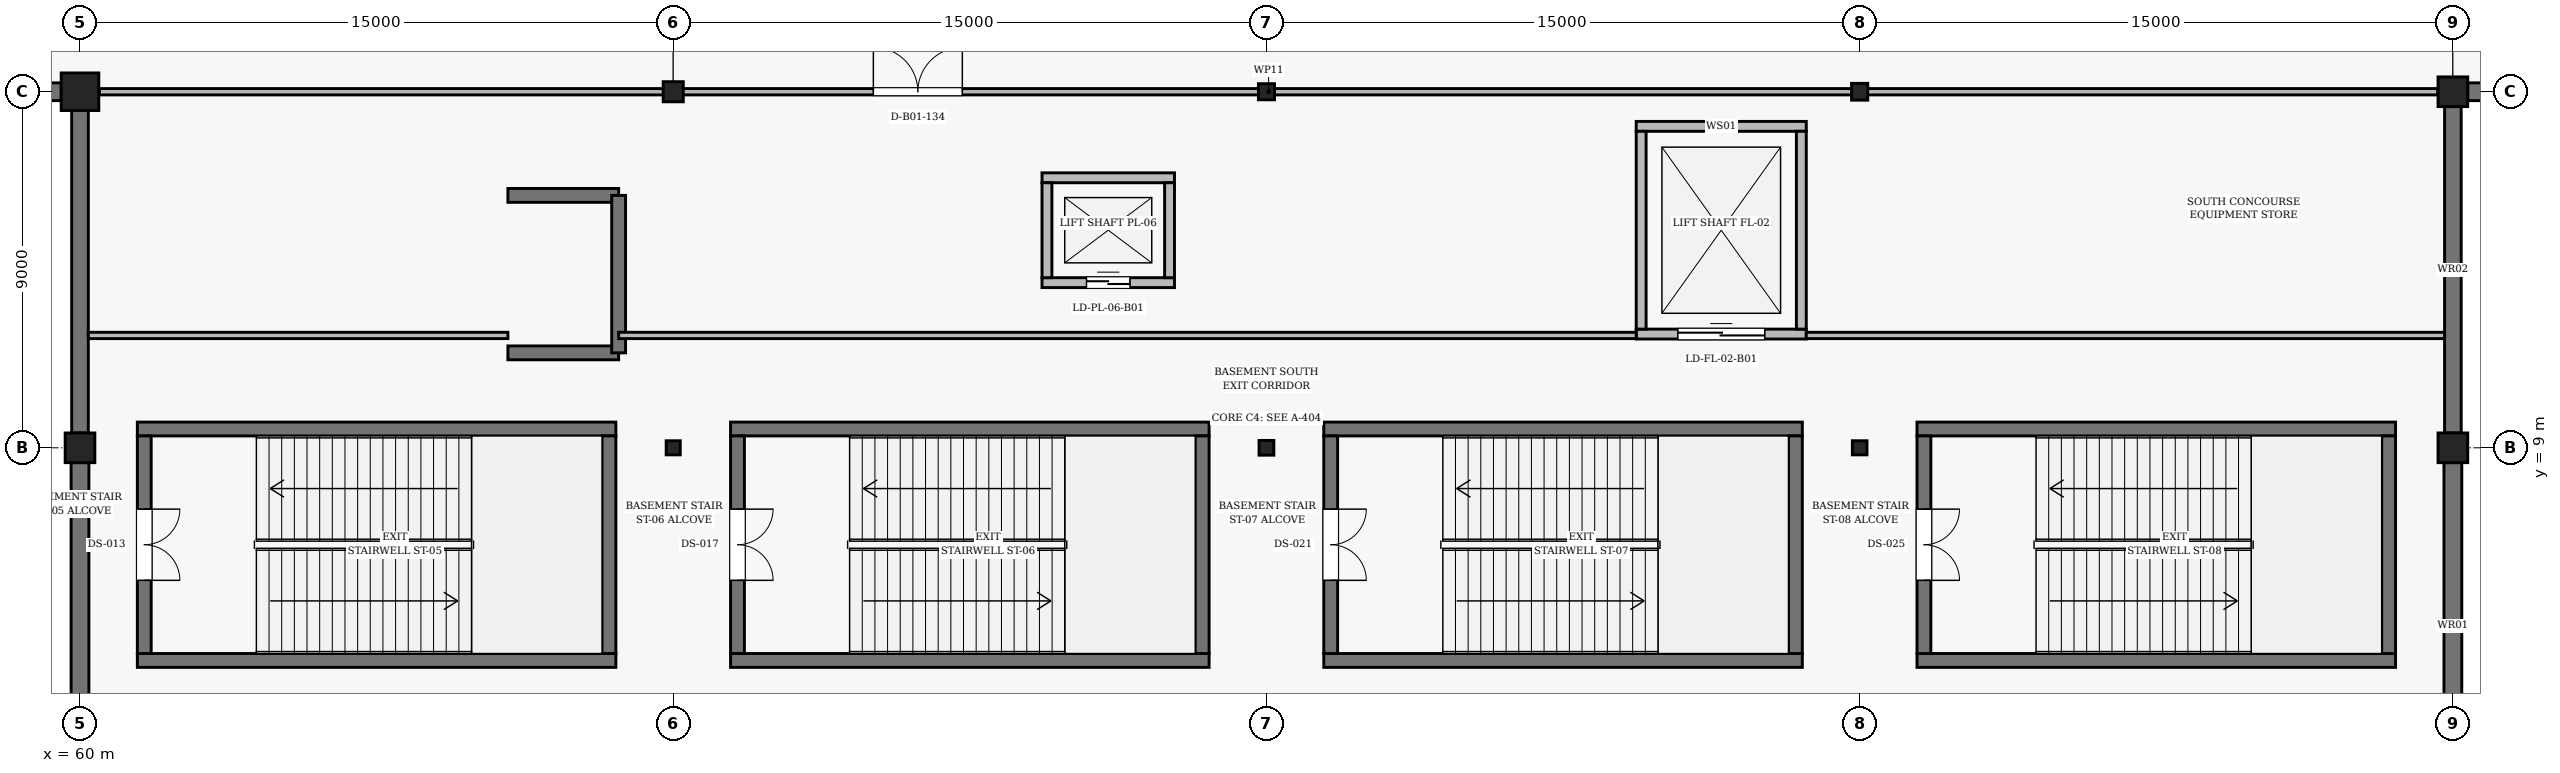
"""IFC4 building model, lengths in metres.
Left out: names, types, materials, properties, quantities, classifications, styles, units other than length and angle.
Written with IfcOpenShell. Run it as: python <this file> out.ifc"""

import sys

from ifc_helpers import new_model, si_unit, direction, frame, frame_2d, origin, origin_2d, place, context, subcontext, project, spatial, rectangle, hollow_circle, i_section, extrude, element, fill, save


model = new_model("IFC4")
c1 = context("Model", 3, precision=1e-05, world=origin(), true_north=direction((0.0, 1.0)))
c2 = subcontext(c1, "Body", "Model", "MODEL_VIEW")
j1 = project(units=[si_unit("LENGTHUNIT", "METRE"), si_unit("PLANEANGLEUNIT", "RADIAN")], contexts=[c1])
p1 = place(None, origin())
s1 = spatial("IfcSite", under=j1, at=p1, CompositionType="ELEMENT")
p2 = place(p1, origin())
s2 = spatial("IfcBuilding", under=s1, at=p2, CompositionType="ELEMENT")
p3 = place(p2, frame((0.0, 0.0, -5.4)))
s3 = spatial("IfcBuildingStorey", under=s2, at=p3, CompositionType="ELEMENT", Elevation=-5.4)
p4 = place(p3, frame((60.0, 9.0, 0.0), z_axis=(0.0, 0.0, 1.0), x_axis=(1.0, 0.0, 0.0)))
e1 = element("IfcColumn", 1, at=p4, inside=s3, PredefinedType="COLUMN", context=c2, shape_type="SweptSolid", body=[
    extrude(rectangle(XDim=0.75, YDim=0.75, at=origin_2d()), origin(), (0.0, 0.0, 1.0), 5.4),
])
p5 = place(p3, frame((60.0, 18.0, 0.0), z_axis=(0.0, 0.0, 1.0), x_axis=(1.0, 0.0, 0.0)))
e2 = element("IfcColumn", 2, at=p5, inside=s3, PredefinedType="COLUMN", context=c2, shape_type="SweptSolid", body=[
    extrude(rectangle(XDim=0.95, YDim=0.95, at=origin_2d()), origin(), (0.0, 0.0, 1.0), 5.4),
])
p6 = place(p3, frame((75.0, 9.0, 0.0), z_axis=(0.0, 0.0, 1.0), x_axis=(1.0, 0.0, 0.0)))
e3 = element("IfcColumn", 3, at=p6, inside=s3, PredefinedType="COLUMN", context=c2, shape_type="SweptSolid", body=[
    extrude(hollow_circle(Radius=0.178, WallThickness=0.016, at=origin_2d()), origin(), (0.0, 0.0, 1.0), 5.4),
])
p7 = place(p3, frame((75.0, 18.0, 0.0), z_axis=(0.0, 0.0, 1.0), x_axis=(1.0, 0.0, 0.0)))
e4 = element("IfcColumn", 4, at=p7, inside=s3, PredefinedType="COLUMN", context=c2, shape_type="SweptSolid", body=[
    extrude(hollow_circle(Radius=0.254, WallThickness=0.02, at=origin_2d()), origin(), (0.0, 0.0, 1.0), 5.4),
])
p8 = place(p3, frame((90.0, 9.0, 0.0), z_axis=(0.0, 0.0, 1.0), x_axis=(1.0, 0.0, 0.0)))
e5 = element("IfcColumn", 5, at=p8, inside=s3, PredefinedType="COLUMN", context=c2, shape_type="SweptSolid", body=[
    extrude(i_section(OverallWidth=0.374, OverallDepth=0.372, WebThickness=0.016, FlangeThickness=0.026, FilletRadius=0.016, at=origin_2d()), origin(), (0.0, 0.0, 1.0), 5.4),
])
p9 = place(p3, frame((90.0, 18.0, 0.0), z_axis=(0.0, 0.0, 1.0), x_axis=(1.0, 0.0, 0.0)))
e6 = element("IfcColumn", 6, at=p9, inside=s3, PredefinedType="COLUMN", context=c2, shape_type="SweptSolid", body=[
    extrude(hollow_circle(Radius=0.203, WallThickness=0.016, at=origin_2d()), origin(), (0.0, 0.0, 1.0), 5.4),
])
p10 = place(p3, frame((105.0, 9.0, 0.0), z_axis=(0.0, 0.0, 1.0), x_axis=(1.0, 0.0, 0.0)))
e7 = element("IfcColumn", 7, at=p10, inside=s3, PredefinedType="COLUMN", context=c2, shape_type="SweptSolid", body=[
    extrude(i_section(OverallWidth=0.369, OverallDepth=0.356, WebThickness=0.011, FlangeThickness=0.018, FilletRadius=0.015, at=origin_2d()), origin(), (0.0, 0.0, 1.0), 5.4),
])
p11 = place(p3, frame((105.0, 18.0, 0.0), z_axis=(0.0, 0.0, 1.0), x_axis=(1.0, 0.0, 0.0)))
e8 = element("IfcColumn", 8, at=p11, inside=s3, PredefinedType="COLUMN", context=c2, shape_type="SweptSolid", body=[
    extrude(i_section(OverallWidth=0.409, OverallDepth=0.425, WebThickness=0.031, FlangeThickness=0.049, FilletRadius=0.02, at=origin_2d()), origin(), (0.0, 0.0, 1.0), 5.4),
])
for number, where, z_axis, x_axis in (
    (9, (120.0, 9.0, 0.0), (0.0, 0.0, 1.0), (1.0, 0.0, 0.0)),
    (10, (120.0, 18.0, 0.0), (0.0, 0.0, 1.0), (1.0, 0.0, 0.0)),
):
    element("IfcColumn", number, at=place(p3, frame(where, z_axis=z_axis, x_axis=x_axis)), inside=s3, PredefinedType="COLUMN", context=c2, shape_type="SweptSolid", body=[
        extrude(rectangle(XDim=0.75, YDim=0.75, at=origin_2d()), origin(), (0.0, 0.0, 1.0), 5.4),
    ])
p12 = place(p3, frame((134.625, 18.0, 0.0), z_axis=(0.0, 0.0, 1.0), x_axis=(-1.0, 0.0, 0.0)))
e11 = element("IfcWall", 11, at=p12, inside=s3, PredefinedType="USERDEFINED", context=c2, shape_type="SweptSolid", body=[
    extrude(rectangle(XDim=14.25, YDim=0.45, at=frame_2d((7.125, 0.0))), origin(), (0.0, 0.0, 1.0), 5.05),
])
p13 = place(p3, frame((120.0, 17.625, 0.0), z_axis=(0.0, 0.0, 1.0), x_axis=(0.0, -1.0, 0.0)))
e12 = element("IfcWall", 12, at=p13, inside=s3, PredefinedType="USERDEFINED", context=c2, shape_type="SweptSolid", body=[
    extrude(rectangle(XDim=8.25, YDim=0.42, at=frame_2d((4.125, 0.0))), origin(), (0.0, 0.0, 1.0), 4.546),
])
p14 = place(p3, frame((120.0, 8.625, 0.0), z_axis=(0.0, 0.0, 1.0), x_axis=(0.0, -1.0, 0.0)))
e13 = element("IfcWall", 13, at=p14, inside=s3, PredefinedType="USERDEFINED", context=c2, shape_type="SweptSolid", body=[
    extrude(rectangle(XDim=8.25, YDim=0.45, at=frame_2d((4.125, 0.0))), origin(), (0.0, 0.0, 1.0), 4.785),
])
p15 = place(p3, frame((60.0, 0.375, 0.0), z_axis=(0.0, 0.0, 1.0), x_axis=(0.0, 1.0, 0.0)))
e14 = element("IfcWall", 14, at=p15, inside=s3, PredefinedType="USERDEFINED", context=c2, shape_type="SweptSolid", body=[
    extrude(rectangle(XDim=8.25, YDim=0.45, at=frame_2d((4.125, 0.0))), origin(), (0.0, 0.0, 1.0), 4.312),
])
p16 = place(p3, frame((60.0, 9.375, 0.0), z_axis=(0.0, 0.0, 1.0), x_axis=(0.0, 1.0, 0.0)))
e15 = element("IfcWall", 15, at=p16, inside=s3, PredefinedType="USERDEFINED", context=c2, shape_type="SweptSolid", body=[
    extrude(rectangle(XDim=8.15, YDim=0.42, at=frame_2d((4.075, 0.0))), origin(), (0.0, 0.0, 1.0), 4.39),
])
p17 = place(p3, frame((59.525, 18.0, 0.0), z_axis=(0.0, 0.0, 1.0), x_axis=(-1.0, 0.0, 0.0)))
e16 = element("IfcWall", 16, at=p17, inside=s3, PredefinedType="USERDEFINED", context=c2, shape_type="SweptSolid", body=[
    extrude(rectangle(XDim=14.15, YDim=0.45, at=frame_2d((7.075, 0.0))), origin(), (0.0, 0.0, 1.0), 4.735),
])
for number, where, z_axis, x_axis in (
    (17, (61.45, 3.625, 0.0), (0.0, 0.0, 1.0), (1.0, 0.0, 0.0)),
    (18, (73.55, 9.475, 0.0), (0.0, 0.0, 1.0), (-1.0, 0.0, 0.0)),
):
    element("IfcWall", number, at=place(p3, frame(where, z_axis=z_axis, x_axis=x_axis)), inside=s3, PredefinedType="SHEAR", context=c2, shape_type="SweptSolid", body=[
        extrude(rectangle(XDim=12.1, YDim=0.35, at=frame_2d((6.05, 0.0))), origin(), (0.0, 0.0, 1.0), 5.1),
    ])
p18 = place(p3, frame((61.625, 9.3, 0.0), z_axis=(0.0, 0.0, 1.0), x_axis=(0.0, -1.0, 0.0)))
e19 = element("IfcWall", 19, at=p18, inside=s3, PredefinedType="SHEAR", context=c2, shape_type="SweptSolid", body=[
    extrude(rectangle(XDim=5.5, YDim=0.35, at=frame_2d((2.75, 0.0))), origin(), (0.0, 0.0, 1.0), 5.1),
])
p19 = place(p18, frame((1.85, 0.0, 0.0)))
e20 = element("IfcOpeningElement", 20, at=p19, cuts=e19, PredefinedType="OPENING", context=c2, shape_type="SweptSolid", body=[
    extrude(rectangle(XDim=1.8, YDim=2.2, at=frame_2d((0.9, 1.1))), frame((0.0, 0.185, 0.0), z_axis=(0.0, -1.0, 0.0), x_axis=(1.0, 0.0, 0.0)), (0.0, 0.0, 1.0), 0.37),
])
p20 = place(p3, frame((73.375, 3.8, 0.0), z_axis=(0.0, 0.0, 1.0), x_axis=(0.0, 1.0, 0.0)))
e21 = element("IfcWall", 21, at=p20, inside=s3, PredefinedType="SHEAR", context=c2, shape_type="SweptSolid", body=[
    extrude(rectangle(XDim=5.5, YDim=0.35, at=frame_2d((2.75, 0.0))), origin(), (0.0, 0.0, 1.0), 5.1),
])
for number, where, z_axis, x_axis in (
    (22, (76.45, 3.625, 0.0), (0.0, 0.0, 1.0), (1.0, 0.0, 0.0)),
    (23, (88.55, 9.475, 0.0), (0.0, 0.0, 1.0), (-1.0, 0.0, 0.0)),
):
    element("IfcWall", number, at=place(p3, frame(where, z_axis=z_axis, x_axis=x_axis)), inside=s3, PredefinedType="SHEAR", context=c2, shape_type="SweptSolid", body=[
        extrude(rectangle(XDim=12.1, YDim=0.35, at=frame_2d((6.05, 0.0))), origin(), (0.0, 0.0, 1.0), 5.1),
    ])
p21 = place(p3, frame((76.625, 9.3, 0.0), z_axis=(0.0, 0.0, 1.0), x_axis=(0.0, -1.0, 0.0)))
e24 = element("IfcWall", 24, at=p21, inside=s3, PredefinedType="SHEAR", context=c2, shape_type="SweptSolid", body=[
    extrude(rectangle(XDim=5.5, YDim=0.35, at=frame_2d((2.75, 0.0))), origin(), (0.0, 0.0, 1.0), 5.1),
])
p22 = place(p21, frame((1.85, 0.0, 0.0)))
e25 = element("IfcOpeningElement", 25, at=p22, cuts=e24, PredefinedType="OPENING", context=c2, shape_type="SweptSolid", body=[
    extrude(rectangle(XDim=1.8, YDim=2.2, at=frame_2d((0.9, 1.1))), frame((0.0, 0.185, 0.0), z_axis=(0.0, -1.0, 0.0), x_axis=(1.0, 0.0, 0.0)), (0.0, 0.0, 1.0), 0.37),
])
p23 = place(p3, frame((88.375, 3.8, 0.0), z_axis=(0.0, 0.0, 1.0), x_axis=(0.0, 1.0, 0.0)))
e26 = element("IfcWall", 26, at=p23, inside=s3, PredefinedType="SHEAR", context=c2, shape_type="SweptSolid", body=[
    extrude(rectangle(XDim=5.5, YDim=0.35, at=frame_2d((2.75, 0.0))), origin(), (0.0, 0.0, 1.0), 5.1),
])
for number, where, z_axis, x_axis in (
    (27, (91.45, 3.625, 0.0), (0.0, 0.0, 1.0), (1.0, 0.0, 0.0)),
    (28, (103.55, 9.475, 0.0), (0.0, 0.0, 1.0), (-1.0, 0.0, 0.0)),
):
    element("IfcWall", number, at=place(p3, frame(where, z_axis=z_axis, x_axis=x_axis)), inside=s3, PredefinedType="SHEAR", context=c2, shape_type="SweptSolid", body=[
        extrude(rectangle(XDim=12.1, YDim=0.35, at=frame_2d((6.05, 0.0))), origin(), (0.0, 0.0, 1.0), 5.1),
    ])
p24 = place(p3, frame((91.625, 9.3, 0.0), z_axis=(0.0, 0.0, 1.0), x_axis=(0.0, -1.0, 0.0)))
e29 = element("IfcWall", 29, at=p24, inside=s3, PredefinedType="SHEAR", context=c2, shape_type="SweptSolid", body=[
    extrude(rectangle(XDim=5.5, YDim=0.35, at=frame_2d((2.75, 0.0))), origin(), (0.0, 0.0, 1.0), 5.1),
])
p25 = place(p24, frame((1.85, 0.0, 0.0)))
e30 = element("IfcOpeningElement", 30, at=p25, cuts=e29, PredefinedType="OPENING", context=c2, shape_type="SweptSolid", body=[
    extrude(rectangle(XDim=1.8, YDim=2.2, at=frame_2d((0.9, 1.1))), frame((0.0, 0.185, 0.0), z_axis=(0.0, -1.0, 0.0), x_axis=(1.0, 0.0, 0.0)), (0.0, 0.0, 1.0), 0.37),
])
p26 = place(p3, frame((103.375, 3.8, 0.0), z_axis=(0.0, 0.0, 1.0), x_axis=(0.0, 1.0, 0.0)))
e31 = element("IfcWall", 31, at=p26, inside=s3, PredefinedType="SHEAR", context=c2, shape_type="SweptSolid", body=[
    extrude(rectangle(XDim=5.5, YDim=0.35, at=frame_2d((2.75, 0.0))), origin(), (0.0, 0.0, 1.0), 5.1),
])
for number, where, z_axis, x_axis in (
    (32, (106.45, 3.625, 0.0), (0.0, 0.0, 1.0), (1.0, 0.0, 0.0)),
    (33, (118.55, 9.475, 0.0), (0.0, 0.0, 1.0), (-1.0, 0.0, 0.0)),
):
    element("IfcWall", number, at=place(p3, frame(where, z_axis=z_axis, x_axis=x_axis)), inside=s3, PredefinedType="SHEAR", context=c2, shape_type="SweptSolid", body=[
        extrude(rectangle(XDim=12.1, YDim=0.35, at=frame_2d((6.05, 0.0))), origin(), (0.0, 0.0, 1.0), 5.1),
    ])
p27 = place(p3, frame((106.625, 9.3, 0.0), z_axis=(0.0, 0.0, 1.0), x_axis=(0.0, -1.0, 0.0)))
e34 = element("IfcWall", 34, at=p27, inside=s3, PredefinedType="SHEAR", context=c2, shape_type="SweptSolid", body=[
    extrude(rectangle(XDim=5.5, YDim=0.35, at=frame_2d((2.75, 0.0))), origin(), (0.0, 0.0, 1.0), 5.1),
])
p28 = place(p27, frame((1.85, 0.0, 0.0)))
e35 = element("IfcOpeningElement", 35, at=p28, cuts=e34, PredefinedType="OPENING", context=c2, shape_type="SweptSolid", body=[
    extrude(rectangle(XDim=1.8, YDim=2.2, at=frame_2d((0.9, 1.1))), frame((0.0, 0.185, 0.0), z_axis=(0.0, -1.0, 0.0), x_axis=(1.0, 0.0, 0.0)), (0.0, 0.0, 1.0), 0.37),
])
p29 = place(p3, frame((118.375, 3.8, 0.0), z_axis=(0.0, 0.0, 1.0), x_axis=(0.0, 1.0, 0.0)))
e36 = element("IfcWall", 36, at=p29, inside=s3, PredefinedType="SHEAR", context=c2, shape_type="SweptSolid", body=[
    extrude(rectangle(XDim=5.5, YDim=0.35, at=frame_2d((2.75, 0.0))), origin(), (0.0, 0.0, 1.0), 5.1),
])
for number, where, z_axis, x_axis in (
    (37, (70.82, 11.4, 0.0), (0.0, 0.0, 1.0), (1.0, 0.0, 0.0)),
    (38, (70.82, 15.38, 0.0), (0.0, 0.0, 1.0), (1.0, 0.0, 0.0)),
):
    element("IfcWall", number, at=place(p3, frame(where, z_axis=z_axis, x_axis=x_axis)), inside=s3, PredefinedType="SHEAR", context=c2, shape_type="SweptSolid", body=[
        extrude(rectangle(XDim=2.8, YDim=0.35, at=frame_2d((1.4, 0.0))), origin(), (0.0, 0.0, 1.0), 5.1),
    ])
p30 = place(p3, frame((73.62, 11.4, 0.0), z_axis=(0.0, 0.0, 1.0), x_axis=(0.0, 1.0, 0.0)))
e39 = element("IfcWall", 39, at=p30, inside=s3, PredefinedType="SHEAR", context=c2, shape_type="SweptSolid", body=[
    extrude(rectangle(XDim=3.98, YDim=0.35, at=frame_2d((1.99, 0.0))), origin(), (0.0, 0.0, 1.0), 5.1),
])
p31 = place(p3, frame((84.325, 13.175, 0.0), z_axis=(0.0, 0.0, 1.0), x_axis=(1.0, 0.0, 0.0)))
e40 = element("IfcWall", 40, at=p31, inside=s3, PredefinedType="SOLIDWALL", context=c2, shape_type="SweptSolid", body=[
    extrude(rectangle(XDim=3.35, YDim=0.25, at=frame_2d((1.675, 0.0))), origin(), (0.0, 0.0, 1.0), 5.1),
])
p32 = place(p31, frame((1.125, 0.0, 0.0)))
e41 = element("IfcOpeningElement", 41, at=p32, cuts=e40, PredefinedType="OPENING", context=c2, shape_type="SweptSolid", body=[
    extrude(rectangle(XDim=1.1, YDim=2.2, at=frame_2d((0.55, 1.1))), frame((0.0, 0.135, 0.0), z_axis=(0.0, -1.0, 0.0), x_axis=(1.0, 0.0, 0.0)), (0.0, 0.0, 1.0), 0.27),
])
p33 = place(p3, frame((87.675, 15.825, 0.0), z_axis=(0.0, 0.0, 1.0), x_axis=(-1.0, 0.0, 0.0)))
e42 = element("IfcWall", 42, at=p33, inside=s3, PredefinedType="SOLIDWALL", context=c2, shape_type="SweptSolid", body=[
    extrude(rectangle(XDim=3.35, YDim=0.25, at=frame_2d((1.675, 0.0))), origin(), (0.0, 0.0, 1.0), 5.1),
])
for number, where, z_axis, x_axis in (
    (43, (84.45, 15.7, 0.0), (0.0, 0.0, 1.0), (0.0, -1.0, 0.0)),
    (44, (87.55, 13.3, 0.0), (0.0, 0.0, 1.0), (0.0, 1.0, 0.0)),
):
    element("IfcWall", number, at=place(p3, frame(where, z_axis=z_axis, x_axis=x_axis)), inside=s3, PredefinedType="SOLIDWALL", context=c2, shape_type="SweptSolid", body=[
        extrude(rectangle(XDim=2.4, YDim=0.25, at=frame_2d((1.2, 0.0))), origin(), (0.0, 0.0, 1.0), 5.1),
    ])
p34 = place(p3, frame((99.35, 11.875, 0.0), z_axis=(0.0, 0.0, 1.0), x_axis=(1.0, 0.0, 0.0)))
e45 = element("IfcWall", 45, at=p34, inside=s3, PredefinedType="SOLIDWALL", context=c2, shape_type="SweptSolid", body=[
    extrude(rectangle(XDim=4.3, YDim=0.25, at=frame_2d((2.15, 0.0))), origin(), (0.0, 0.0, 1.0), 5.1),
])
p35 = place(p34, frame((1.05, 0.0, 0.0)))
e46 = element("IfcOpeningElement", 46, at=p35, cuts=e45, PredefinedType="OPENING", context=c2, shape_type="SweptSolid", body=[
    extrude(rectangle(XDim=2.2, YDim=2.5, at=frame_2d((1.1, 1.25))), frame((0.0, 0.135, 0.0), z_axis=(0.0, -1.0, 0.0), x_axis=(1.0, 0.0, 0.0)), (0.0, 0.0, 1.0), 0.27),
])
p36 = place(p3, frame((103.65, 17.125, 0.0), z_axis=(0.0, 0.0, 1.0), x_axis=(-1.0, 0.0, 0.0)))
e47 = element("IfcWall", 47, at=p36, inside=s3, PredefinedType="SOLIDWALL", context=c2, shape_type="SweptSolid", body=[
    extrude(rectangle(XDim=4.3, YDim=0.25, at=frame_2d((2.15, 0.0))), origin(), (0.0, 0.0, 1.0), 5.1),
])
for number, where, z_axis, x_axis in (
    (48, (99.475, 17.0, 0.0), (0.0, 0.0, 1.0), (0.0, -1.0, 0.0)),
    (49, (103.525, 12.0, 0.0), (0.0, 0.0, 1.0), (0.0, 1.0, 0.0)),
):
    element("IfcWall", number, at=place(p3, frame(where, z_axis=z_axis, x_axis=x_axis)), inside=s3, PredefinedType="SOLIDWALL", context=c2, shape_type="SweptSolid", body=[
        extrude(rectangle(XDim=5.0, YDim=0.25, at=frame_2d((2.5, 0.0))), origin(), (0.0, 0.0, 1.0), 5.1),
    ])
p37 = place(p3, frame((60.49, 18.0, 0.0), z_axis=(0.0, 0.0, 1.0), x_axis=(1.0, 0.0, 0.0)))
e50 = element("IfcWall", 50, at=p37, inside=s3, PredefinedType="PARTITIONING", context=c2, shape_type="SweptSolid", body=[
    extrude(rectangle(XDim=59.13, YDim=0.16, at=frame_2d((29.565, 0.0))), origin(), (0.0, 0.0, 1.0), 4.18),
])
p38 = place(p37, frame((19.571, 0.0, 0.0)))
e51 = element("IfcOpeningElement", 51, at=p38, cuts=e50, PredefinedType="OPENING", context=c2, shape_type="SweptSolid", body=[
    extrude(rectangle(XDim=2.25, YDim=2.4, at=frame_2d((1.125, 1.2))), frame((0.0, 0.09, 0.0), z_axis=(0.0, -1.0, 0.0), x_axis=(1.0, 0.0, 0.0)), (0.0, 0.0, 1.0), 0.18),
])
p39 = place(p3, frame((119.79, 11.84, 0.0), z_axis=(0.0, 0.0, 1.0), x_axis=(-1.0, 0.0, 0.0)))
e52 = element("IfcWall", 52, at=p39, inside=s3, PredefinedType="PARTITIONING", context=c2, shape_type="SweptSolid", body=[
    extrude(rectangle(XDim=16.14, YDim=0.16, at=frame_2d((8.07, 0.0))), origin(), (0.0, 0.0, 1.0), 4.474),
])
p40 = place(p3, frame((99.35, 11.84, 0.0), z_axis=(0.0, 0.0, 1.0), x_axis=(-1.0, 0.0, 0.0)))
e53 = element("IfcWall", 53, at=p40, inside=s3, PredefinedType="PARTITIONING", context=c2, shape_type="SweptSolid", body=[
    extrude(rectangle(XDim=25.73, YDim=0.16, at=frame_2d((12.865, 0.0))), origin(), (0.0, 0.0, 1.0), 4.39),
])
p41 = place(p3, frame((70.82, 11.84, 0.0), z_axis=(0.0, 0.0, 1.0), x_axis=(-1.0, 0.0, 0.0)))
e54 = element("IfcWall", 54, at=p41, inside=s3, PredefinedType="PARTITIONING", context=c2, shape_type="SweptSolid", body=[
    extrude(rectangle(XDim=10.61, YDim=0.16, at=frame_2d((5.305, 0.0))), origin(), (0.0, 0.0, 1.0), 4.39),
])
p42 = place(p19, origin())
e55 = element("IfcDoor", 55, at=p42, inside=s3, OperationType="DOUBLE_DOOR_SINGLE_SWING", PredefinedType="DOOR", context=c2, shape_type="SweptSolid", body=[
    extrude(rectangle(XDim=1.8, YDim=2.2, at=frame_2d((0.9, 1.1))), frame((0.0, 0.025, 0.0), z_axis=(0.0, -1.0, 0.0), x_axis=(1.0, 0.0, 0.0)), (0.0, 0.0, 1.0), 0.05),
])
fill(e20, e55)
p43 = place(p22, origin())
e56 = element("IfcDoor", 56, at=p43, inside=s3, OperationType="DOUBLE_DOOR_SINGLE_SWING", PredefinedType="DOOR", context=c2, shape_type="SweptSolid", body=[
    extrude(rectangle(XDim=1.8, YDim=2.2, at=frame_2d((0.9, 1.1))), frame((0.0, 0.025, 0.0), z_axis=(0.0, -1.0, 0.0), x_axis=(1.0, 0.0, 0.0)), (0.0, 0.0, 1.0), 0.05),
])
fill(e25, e56)
p44 = place(p25, origin())
e57 = element("IfcDoor", 57, at=p44, inside=s3, OperationType="DOUBLE_DOOR_SINGLE_SWING", PredefinedType="DOOR", context=c2, shape_type="SweptSolid", body=[
    extrude(rectangle(XDim=1.8, YDim=2.2, at=frame_2d((0.9, 1.1))), frame((0.0, 0.025, 0.0), z_axis=(0.0, -1.0, 0.0), x_axis=(1.0, 0.0, 0.0)), (0.0, 0.0, 1.0), 0.05),
])
fill(e30, e57)
p45 = place(p28, origin())
e58 = element("IfcDoor", 58, at=p45, inside=s3, OperationType="DOUBLE_DOOR_SINGLE_SWING", PredefinedType="DOOR", context=c2, shape_type="SweptSolid", body=[
    extrude(rectangle(XDim=1.8, YDim=2.2, at=frame_2d((0.9, 1.1))), frame((0.0, 0.025, 0.0), z_axis=(0.0, -1.0, 0.0), x_axis=(1.0, 0.0, 0.0)), (0.0, 0.0, 1.0), 0.05),
])
fill(e35, e58)
p46 = place(p32, origin())
e59 = element("IfcDoor", 59, at=p46, inside=s3, OperationType="DOUBLE_DOOR_SLIDING", PredefinedType="DOOR", context=c2, shape_type="SweptSolid", body=[
    extrude(rectangle(XDim=1.1, YDim=2.2, at=frame_2d((0.55, 1.1))), frame((0.0, 0.025, 0.0), z_axis=(0.0, -1.0, 0.0), x_axis=(1.0, 0.0, 0.0)), (0.0, 0.0, 1.0), 0.05),
])
fill(e41, e59)
p47 = place(p35, origin())
e60 = element("IfcDoor", 60, at=p47, inside=s3, OperationType="DOUBLE_DOOR_SLIDING", PredefinedType="DOOR", context=c2, shape_type="SweptSolid", body=[
    extrude(rectangle(XDim=2.2, YDim=2.5, at=frame_2d((1.1, 1.25))), frame((0.0, 0.025, 0.0), z_axis=(0.0, -1.0, 0.0), x_axis=(1.0, 0.0, 0.0)), (0.0, 0.0, 1.0), 0.05),
])
fill(e46, e60)
p48 = place(p38, origin())
e61 = element("IfcDoor", 61, at=p48, inside=s3, OperationType="DOUBLE_DOOR_SINGLE_SWING", PredefinedType="DOOR", context=c2, shape_type="SweptSolid", body=[
    extrude(rectangle(XDim=2.25, YDim=2.4, at=frame_2d((1.125, 1.2))), frame((0.0, 0.025, 0.0), z_axis=(0.0, -1.0, 0.0), x_axis=(1.0, 0.0, 0.0)), (0.0, 0.0, 1.0), 0.05),
])
fill(e51, e61)
save(model, sys.argv[1])
